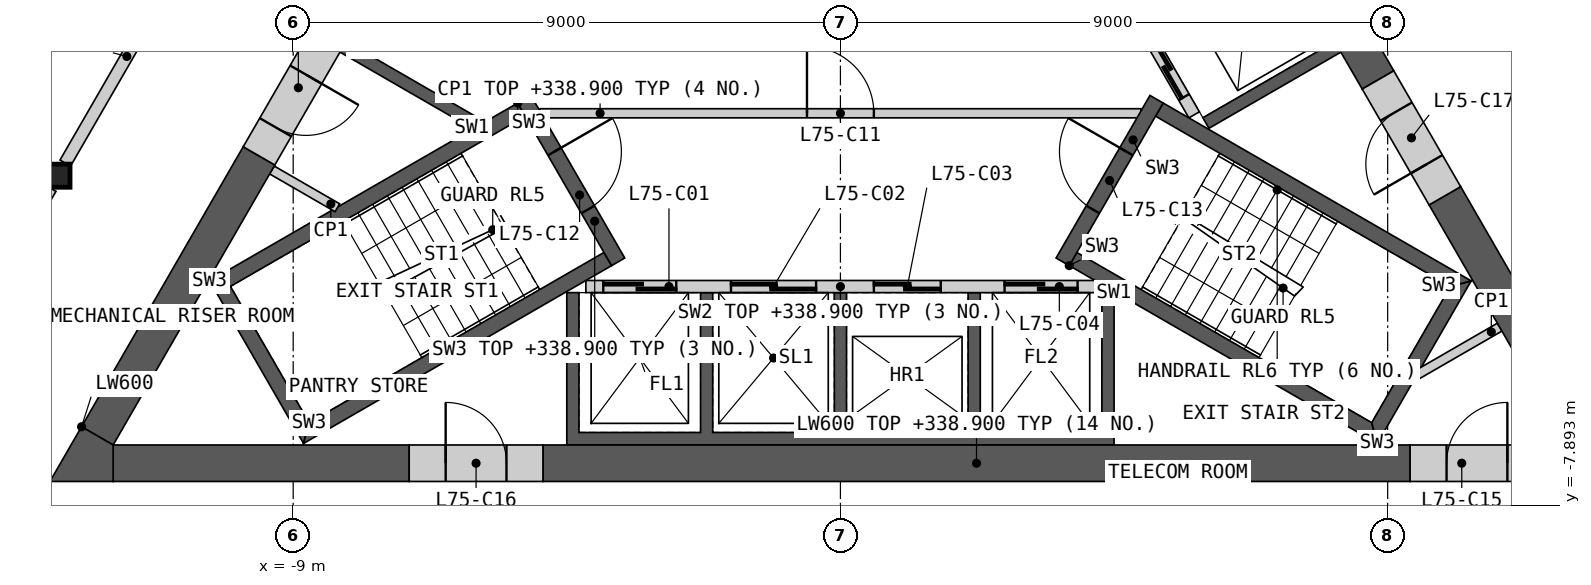
"""IFC4 building model, lengths in metres.
Left out: names, types, materials, properties, quantities, classifications, styles, units other than length and angle.
Written with IfcOpenShell. Run it as: python <this file> out.ifc"""

import sys

from ifc_helpers import new_model, si_unit, direction, frame, frame_2d, origin, origin_2d, place, context, subcontext, project, spatial, polyline, rectangle, i_section, outline, extrude, element, fill, save


model = new_model("IFC4")
c1 = context("Model", 3, precision=1e-05, world=origin(), true_north=direction((0.0, 1.0)))
c2 = subcontext(c1, "Body", "Model", "MODEL_VIEW")
j1 = project(units=[si_unit("LENGTHUNIT", "METRE"), si_unit("PLANEANGLEUNIT", "RADIAN")], contexts=[c1])
p1 = place(None, origin())
s1 = spatial("IfcSite", under=j1, at=p1, CompositionType="ELEMENT")
p2 = place(p1, origin())
s2 = spatial("IfcBuilding", under=s1, at=p2, CompositionType="ELEMENT")
p3 = place(p2, frame((0.0, 0.0, 335.8)))
s3 = spatial("IfcBuildingStorey", under=s2, at=p3, CompositionType="ELEMENT", Elevation=335.8)
p4 = place(p3, frame((-12.868, -2.476, 0.0), z_axis=(0.0, 0.0, 1.0), x_axis=(1.0, 0.0, 0.0)))
e1 = element("IfcColumn", 1, at=p4, inside=s3, PredefinedType="COLUMN", context=c2, shape_type="SweptSolid", body=[
    extrude(i_section(OverallWidth=0.396, OverallDepth=0.381, WebThickness=0.019, FlangeThickness=0.03, at=origin_2d()), origin(), (0.0, 0.0, 1.0), 3.4),
])
p5 = place(p3, origin())
e2 = element("IfcWall", 2, at=p5, inside=s3, PredefinedType="SHEAR", context=c2, shape_type="SweptSolid", body=[
    extrude(outline(polyline([(4.5, -4.4), (4.5, -6.906), (-4.5, -6.906), (-4.5, -4.4), (-4.3, -4.4), (-4.3, -6.7), (-2.3, -6.7), (-2.3, -4.4), (-2.1, -4.4), (-2.1, -6.7), (-0.1, -6.7), (-0.1, -4.4), (0.1, -4.4), (0.1, -6.7), (2.1, -6.7), (2.1, -4.4), (2.3, -4.4), (2.3, -6.7), (4.3, -6.7), (4.3, -4.4), (4.5, -4.4)])), origin(), (0.0, 0.0, 1.0), 3.1),
])
p6 = place(p3, frame((-4.187, -4.3, 0.0), z_axis=(0.0, 0.0, 1.0), x_axis=(1.0, 0.0, 0.0)))
e3 = element("IfcWall", 3, at=p6, inside=s3, PredefinedType="SOLIDWALL", context=c2, shape_type="SweptSolid", body=[
    extrude(rectangle(XDim=8.373, YDim=0.2, at=frame_2d((4.187, 0.0))), origin(), (0.0, 0.0, 1.0), 3.1),
])
p7 = place(p6, frame((0.287, 0.0, 0.0)))
e4 = element("IfcOpeningElement", 4, at=p7, cuts=e3, PredefinedType="OPENING", context=c2, shape_type="SweptSolid", body=[
    extrude(rectangle(XDim=1.2, YDim=2.1, at=frame_2d((0.6, 1.05))), frame((0.0, 0.11, 0.0), z_axis=(0.0, -1.0, 0.0), x_axis=(1.0, 0.0, 0.0)), (0.0, 0.0, 1.0), 0.22),
])
p8 = place(p6, frame((2.387, 0.0, 0.0)))
e5 = element("IfcOpeningElement", 5, at=p8, cuts=e3, PredefinedType="OPENING", context=c2, shape_type="SweptSolid", body=[
    extrude(rectangle(XDim=1.4, YDim=2.1, at=frame_2d((0.7, 1.05))), frame((0.0, 0.11, 0.0), z_axis=(0.0, -1.0, 0.0), x_axis=(1.0, 0.0, 0.0)), (0.0, 0.0, 1.0), 0.22),
])
p9 = place(p6, frame((4.737, 0.0, 0.0)))
e6 = element("IfcOpeningElement", 6, at=p9, cuts=e3, PredefinedType="OPENING", context=c2, shape_type="SweptSolid", body=[
    extrude(rectangle(XDim=1.1, YDim=2.1, at=frame_2d((0.55, 1.05))), frame((0.0, 0.11, 0.0), z_axis=(0.0, -1.0, 0.0), x_axis=(1.0, 0.0, 0.0)), (0.0, 0.0, 1.0), 0.22),
])
p10 = place(p6, frame((6.887, 0.0, 0.0)))
e7 = element("IfcOpeningElement", 7, at=p10, cuts=e3, PredefinedType="OPENING", context=c2, shape_type="SweptSolid", body=[
    extrude(rectangle(XDim=1.2, YDim=2.1, at=frame_2d((0.6, 1.05))), frame((0.0, 0.11, 0.0), z_axis=(0.0, -1.0, 0.0), x_axis=(1.0, 0.0, 0.0)), (0.0, 0.0, 1.0), 0.22),
])
p11 = place(p3, origin())
e8 = element("IfcWall", 8, at=p11, inside=s3, PredefinedType="SHEAR", context=c2, shape_type="SweptSolid", body=[
    extrude(outline(polyline([(1.561, 6.097), (3.731, 7.35), (8.231, -0.444), (6.061, -1.697), (5.96, -1.524), (7.952, -0.374), (6.952, 1.358), (4.96, 0.208), (4.861, 0.381), (6.852, 1.531), (5.852, 3.263), (3.861, 2.113), (3.76, 2.287), (5.752, 3.437), (4.752, 5.169), (2.76, 4.019), (2.66, 4.192), (4.652, 5.342), (3.652, 7.074), (1.66, 5.924), (1.561, 6.097)])), origin(), (0.0, 0.0, 1.0), 3.1),
])
p12 = place(p3, frame((5.817, -1.476, 0.0), z_axis=(0.0, 0.0, 1.0), x_axis=(-0.500002616675, 0.866023893041, 0.0)))
e9 = element("IfcWall", 9, at=p12, inside=s3, PredefinedType="SOLIDWALL", context=c2, shape_type="SweptSolid", body=[
    extrude(rectangle(XDim=8.373, YDim=0.2, at=frame_2d((4.187, 0.0))), origin(), (0.0, 0.0, 1.0), 3.1),
])
p13 = place(p12, frame((0.337, 0.0, 0.0)))
e10 = element("IfcOpeningElement", 10, at=p13, cuts=e9, PredefinedType="OPENING", context=c2, shape_type="SweptSolid", body=[
    extrude(rectangle(XDim=1.1, YDim=2.1, at=frame_2d((0.55, 1.05))), frame((0.0, 0.11, 0.0), z_axis=(0.0, -1.0, 0.0), x_axis=(1.0, 0.0, 0.0)), (0.0, 0.0, 1.0), 0.22),
])
p14 = place(p12, frame((2.537, 0.0, 0.0)))
e11 = element("IfcOpeningElement", 11, at=p14, cuts=e9, PredefinedType="OPENING", context=c2, shape_type="SweptSolid", body=[
    extrude(rectangle(XDim=1.1, YDim=2.1, at=frame_2d((0.55, 1.05))), frame((0.0, 0.11, 0.0), z_axis=(0.0, -1.0, 0.0), x_axis=(1.0, 0.0, 0.0)), (0.0, 0.0, 1.0), 0.22),
])
p15 = place(p12, frame((4.737, 0.0, 0.0)))
e12 = element("IfcOpeningElement", 12, at=p15, cuts=e9, PredefinedType="OPENING", context=c2, shape_type="SweptSolid", body=[
    extrude(rectangle(XDim=1.1, YDim=2.1, at=frame_2d((0.55, 1.05))), frame((0.0, 0.11, 0.0), z_axis=(0.0, -1.0, 0.0), x_axis=(1.0, 0.0, 0.0)), (0.0, 0.0, 1.0), 0.22),
])
p16 = place(p12, frame((7.037, 0.0, 0.0)))
e13 = element("IfcOpeningElement", 13, at=p16, cuts=e9, PredefinedType="OPENING", context=c2, shape_type="SweptSolid", body=[
    extrude(rectangle(XDim=0.9, YDim=2.1, at=frame_2d((0.45, 1.05))), frame((0.0, 0.11, 0.0), z_axis=(0.0, -1.0, 0.0), x_axis=(1.0, 0.0, 0.0)), (0.0, 0.0, 1.0), 0.22),
])
p17 = place(p3, origin())
e14 = element("IfcWall", 14, at=p17, inside=s3, PredefinedType="SHEAR", context=c2, shape_type="SweptSolid", body=[
    extrude(outline(polyline([(-6.061, -1.697), (-8.231, -0.444), (-8.131, -0.271), (-5.96, -1.524), (-6.061, -1.697)])), origin(), (0.0, 0.0, 1.0), 3.1),
])
p18 = place(p3, frame((-4.941, -1.45, 0.0), z_axis=(0.0, 0.0, 1.0), x_axis=(1.0, 0.0, 0.0)))
e15 = element("IfcWall", 15, at=p18, inside=s3, PredefinedType="PARTITIONING", context=c2, shape_type="SweptSolid", body=[
    extrude(rectangle(XDim=9.882, YDim=0.15, at=frame_2d((4.941, 0.0))), origin(), (0.0, 0.0, 1.0), 3.1),
])
p19 = place(p18, frame((4.391, 0.0, 0.0)))
e16 = element("IfcOpeningElement", 16, at=p19, cuts=e15, PredefinedType="OPENING", context=c2, shape_type="SweptSolid", body=[
    extrude(rectangle(XDim=1.1, YDim=2.1, at=frame_2d((0.55, 1.05))), frame((0.0, 0.085, 0.0), z_axis=(0.0, -1.0, 0.0), x_axis=(1.0, 0.0, 0.0)), (0.0, 0.0, 1.0), 0.17),
])
p20 = place(p3, origin())
e17 = element("IfcWall", 17, at=p20, inside=s3, PredefinedType="SHEAR", context=c2, shape_type="SweptSolid", body=[
    extrude(outline(polyline([(-5.307, -1.281), (-10.374, -4.206), (-10.032, -4.298), (-5.182, -1.498), (-5.307, -1.281)])), origin(), (0.0, 0.0, 1.0), 3.1),
])
p21 = place(p3, origin())
e18 = element("IfcWall", 18, at=p21, inside=s3, PredefinedType="SHEAR", context=c2, shape_type="SweptSolid", body=[
    extrude(outline(polyline([(-10.374, -4.206), (-8.83, -6.881), (-8.738, -6.539), (-10.032, -4.298), (-10.374, -4.206)])), origin(), (0.0, 0.0, 1.0), 3.1),
])
p22 = place(p3, origin())
e19 = element("IfcWall", 19, at=p22, inside=s3, PredefinedType="SHEAR", context=c2, shape_type="SweptSolid", body=[
    extrude(outline(polyline([(-8.738, -6.539), (-8.83, -6.881), (-3.763, -3.956), (-3.888, -3.739), (-8.738, -6.539)])), origin(), (0.0, 0.0, 1.0), 3.1),
])
p23 = place(p3, frame((-5.199, -1.219, 0.0), z_axis=(0.0, 0.0, 1.0), x_axis=(0.499982516597, -0.866035497597, 0.0)))
e20 = element("IfcWall", 20, at=p23, inside=s3, PredefinedType="SHEAR", context=c2, shape_type="SweptSolid", body=[
    extrude(rectangle(XDim=3.088, YDim=0.25, at=frame_2d((1.544, 0.0))), origin(), (0.0, 0.0, 1.0), 3.1),
])
p24 = place(p23, frame((0.994, 0.0, 0.0)))
e21 = element("IfcOpeningElement", 21, at=p24, cuts=e20, PredefinedType="OPENING", context=c2, shape_type="SweptSolid", body=[
    extrude(rectangle(XDim=1.1, YDim=2.1, at=frame_2d((0.55, 1.05))), frame((0.0, 0.135, 0.0), z_axis=(0.0, -1.0, 0.0), x_axis=(1.0, 0.0, 0.0)), (0.0, 0.0, 1.0), 0.27),
])
p25 = place(p3, origin())
e22 = element("IfcWall", 22, at=p25, inside=s3, PredefinedType="SHEAR", context=c2, shape_type="SweptSolid", body=[
    extrude(outline(polyline([(3.763, -3.956), (8.83, -6.881), (8.738, -6.539), (3.888, -3.739), (3.763, -3.956)])), origin(), (0.0, 0.0, 1.0), 3.1),
])
p26 = place(p3, origin())
e23 = element("IfcWall", 23, at=p26, inside=s3, PredefinedType="SHEAR", context=c2, shape_type="SweptSolid", body=[
    extrude(outline(polyline([(8.83, -6.881), (10.374, -4.206), (10.032, -4.298), (8.738, -6.539), (8.83, -6.881)])), origin(), (0.0, 0.0, 1.0), 3.1),
])
p27 = place(p3, origin())
e24 = element("IfcWall", 24, at=p27, inside=s3, PredefinedType="SHEAR", context=c2, shape_type="SweptSolid", body=[
    extrude(outline(polyline([(10.032, -4.298), (10.374, -4.206), (5.307, -1.281), (5.182, -1.498), (10.032, -4.298)])), origin(), (0.0, 0.0, 1.0), 3.1),
])
p28 = place(p3, frame((3.655, -3.893, 0.0), z_axis=(0.0, 0.0, 1.0), x_axis=(0.499982516597, 0.866035497597, 0.0)))
e25 = element("IfcWall", 25, at=p28, inside=s3, PredefinedType="SHEAR", context=c2, shape_type="SweptSolid", body=[
    extrude(rectangle(XDim=3.088, YDim=0.25, at=frame_2d((1.544, 0.0))), origin(), (0.0, 0.0, 1.0), 3.1),
])
p29 = place(p28, frame((0.994, 0.0, 0.0)))
e26 = element("IfcOpeningElement", 26, at=p29, cuts=e25, PredefinedType="OPENING", context=c2, shape_type="SweptSolid", body=[
    extrude(rectangle(XDim=1.1, YDim=2.1, at=frame_2d((0.55, 1.05))), frame((0.0, 0.135, 0.0), z_axis=(0.0, -1.0, 0.0), x_axis=(1.0, 0.0, 0.0)), (0.0, 0.0, 1.0), 0.27),
])
p30 = place(p3, frame((-9.35, -2.383, 0.0), z_axis=(0.0, 0.0, 1.0), x_axis=(0.866057962423, -0.499943602543, 0.0)))
e27 = element("IfcWall", 27, at=p30, inside=s3, PredefinedType="PARTITIONING", context=c2, shape_type="SweptSolid", body=[
    extrude(rectangle(XDim=1.242, YDim=0.15, at=frame_2d((0.621, 0.0))), origin(), (0.0, 0.0, 1.0), 3.1),
])
p31 = place(p3, frame((10.842, -4.967, 0.0), z_axis=(0.0, 0.0, 1.0), x_axis=(-0.866098216386, -0.499873863663, 0.0)))
e28 = element("IfcWall", 28, at=p31, inside=s3, PredefinedType="PARTITIONING", context=c2, shape_type="SweptSolid", body=[
    extrude(rectangle(XDim=1.582, YDim=0.15, at=frame_2d((0.791, 0.0))), origin(), (0.0, 0.0, 1.0), 3.1),
])
p32 = place(p3, frame((-4.892, -7.206, 0.0), z_axis=(0.0, 0.0, 1.0), x_axis=(1.0, 0.0, 0.0)))
e29 = element("IfcWall", 29, at=p32, inside=s3, PredefinedType="SHEAR", context=c2, shape_type="SweptSolid", body=[
    extrude(rectangle(XDim=14.261, YDim=0.6, at=frame_2d((7.13, 0.0))), origin(), (0.0, 0.0, 1.0), 3.1),
])
p33 = place(p3, frame((-11.961, -7.206, 0.0), z_axis=(0.0, 0.0, 1.0), x_axis=(1.0, 0.0, 0.0)))
e30 = element("IfcWall", 30, at=p33, inside=s3, PredefinedType="SHEAR", context=c2, shape_type="SweptSolid", body=[
    extrude(rectangle(XDim=4.868, YDim=0.6, at=frame_2d((2.434, 0.0))), origin(), (0.0, 0.0, 1.0), 3.1),
])
p34 = place(p3, frame((8.841, -0.902, 0.0), z_axis=(0.0, 0.0, 1.0), x_axis=(-0.499995618375, 0.866027933502, 0.0)))
e31 = element("IfcWall", 31, at=p34, inside=s3, PredefinedType="SHEAR", context=c2, shape_type="SweptSolid", body=[
    extrude(rectangle(XDim=14.571, YDim=0.6, at=frame_2d((7.285, 0.0))), origin(), (0.0, 0.0, 1.0), 3.1),
])
p35 = place(p3, frame((12.221, -6.756, 0.0), z_axis=(0.0, 0.0, 1.0), x_axis=(-0.500020646047, 0.866013483456, 0.0)))
e32 = element("IfcWall", 32, at=p35, inside=s3, PredefinedType="SHEAR", context=c2, shape_type="SweptSolid", body=[
    extrude(rectangle(XDim=4.559, YDim=0.6, at=frame_2d((2.28, 0.0))), origin(), (0.0, 0.0, 1.0), 3.1),
])
p36 = place(p3, frame((-9.562, -2.15, 0.0), z_axis=(0.0, 0.0, 1.0), x_axis=(-0.500015214976, -0.866016619236, 0.0)))
e33 = element("IfcWall", 33, at=p36, inside=s3, PredefinedType="SHEAR", context=c2, shape_type="SweptSolid", body=[
    extrude(rectangle(XDim=5.318, YDim=0.6, at=frame_2d((2.659, 0.0))), origin(), (0.0, 0.0, 1.0), 3.1),
])
p37 = place(p3, origin())
e34 = element("IfcWall", 34, at=p37, inside=s3, PredefinedType="SHEAR", context=c2, shape_type="SweptSolid", body=[
    extrude(outline(polyline([(-12.48, -6.606), (-11.961, -6.906), (-11.961, -7.506), (-13.0, -7.506), (-12.48, -6.606)])), origin(), (0.0, 0.0, 1.0), 3.1),
])
p38 = place(p3, frame((9.369, -7.206, 0.0), z_axis=(0.0, 0.0, 1.0), x_axis=(1.0, 0.0, 0.0)))
e35 = element("IfcWall", 35, at=p38, inside=s3, PredefinedType="SHEAR", context=c2, shape_type="SweptSolid", body=[
    extrude(rectangle(XDim=2.592, YDim=0.6, at=frame_2d((1.296, 0.0))), origin(), (0.0, 0.0, 1.0), 3.1),
])
p39 = place(p38, frame((0.6, 0.0, 0.0)))
e36 = element("IfcOpeningElement", 36, at=p39, cuts=e35, PredefinedType="OPENING", context=c2, shape_type="SweptSolid", body=[
    extrude(rectangle(XDim=1.0, YDim=2.1, at=frame_2d((0.5, 1.05))), frame((0.0, 0.31, 0.0), z_axis=(0.0, -1.0, 0.0), x_axis=(1.0, 0.0, 0.0)), (0.0, 0.0, 1.0), 0.62),
])
p40 = place(p3, frame((-7.092, -7.206, 0.0), z_axis=(0.0, 0.0, 1.0), x_axis=(1.0, 0.0, 0.0)))
e37 = element("IfcWall", 37, at=p40, inside=s3, PredefinedType="SHEAR", context=c2, shape_type="SweptSolid", body=[
    extrude(rectangle(XDim=2.2, YDim=0.6, at=frame_2d((1.1, 0.0))), origin(), (0.0, 0.0, 1.0), 3.1),
])
p41 = place(p40, frame((0.6, 0.0, 0.0)))
e38 = element("IfcOpeningElement", 38, at=p41, cuts=e37, PredefinedType="OPENING", context=c2, shape_type="SweptSolid", body=[
    extrude(rectangle(XDim=1.0, YDim=2.1, at=frame_2d((0.5, 1.05))), frame((0.0, 0.31, 0.0), z_axis=(0.0, -1.0, 0.0), x_axis=(1.0, 0.0, 0.0)), (0.0, 0.0, 1.0), 0.62),
])
p42 = place(p3, frame((9.941, -2.807, 0.0), z_axis=(0.0, 0.0, 1.0), x_axis=(-0.499994660107, 0.866028486751, 0.0)))
e39 = element("IfcWall", 39, at=p42, inside=s3, PredefinedType="SHEAR", context=c2, shape_type="SweptSolid", body=[
    extrude(rectangle(XDim=2.2, YDim=0.6, at=frame_2d((1.1, 0.0))), origin(), (0.0, 0.0, 1.0), 3.1),
])
p43 = place(p42, frame((0.6, 0.0, 0.0)))
e40 = element("IfcOpeningElement", 40, at=p43, cuts=e39, PredefinedType="OPENING", context=c2, shape_type="SweptSolid", body=[
    extrude(rectangle(XDim=1.0, YDim=2.1, at=frame_2d((0.5, 1.05))), frame((0.0, 0.31, 0.0), z_axis=(0.0, -1.0, 0.0), x_axis=(1.0, 0.0, 0.0)), (0.0, 0.0, 1.0), 0.62),
])
p44 = place(p3, frame((-8.44, -0.208, 0.0), z_axis=(0.0, 0.0, 1.0), x_axis=(-0.500001951578, -0.866024277037, 0.0)))
e41 = element("IfcWall", 41, at=p44, inside=s3, PredefinedType="SHEAR", context=c2, shape_type="SweptSolid", body=[
    extrude(rectangle(XDim=2.243, YDim=0.6, at=frame_2d((1.122, 0.0))), origin(), (0.0, 0.0, 1.0), 3.1),
])
p45 = place(p44, frame((0.7, 0.0, 0.0)))
e42 = element("IfcOpeningElement", 42, at=p45, cuts=e41, PredefinedType="OPENING", context=c2, shape_type="SweptSolid", body=[
    extrude(rectangle(XDim=1.0, YDim=2.1, at=frame_2d((0.5, 1.05))), frame((0.0, 0.31, 0.0), z_axis=(0.0, -1.0, 0.0), x_axis=(1.0, 0.0, 0.0)), (0.0, 0.0, 1.0), 0.62),
])
p46 = place(p3, frame((8.698, 4.745, 0.0), z_axis=(0.0, 0.0, 1.0), x_axis=(0.499984266882, -0.866034487114, 0.0)))
e43 = element("IfcWall", 43, at=p46, inside=s3, PredefinedType="PARTITIONING", context=c2, shape_type="SweptSolid", body=[
    extrude(rectangle(XDim=8.099, YDim=0.2, at=frame_2d((4.049, 0.0))), origin(), (0.0, 0.0, 1.0), 3.1),
])
p47 = place(p46, frame((1.164, 0.0, 0.0)))
e44 = element("IfcOpeningElement", 44, at=p47, cuts=e43, PredefinedType="OPENING", context=c2, shape_type="SweptSolid", body=[
    extrude(rectangle(XDim=1.0, YDim=2.1, at=frame_2d((0.5, 1.05))), frame((0.0, 0.11, 0.0), z_axis=(0.0, -1.0, 0.0), x_axis=(1.0, 0.0, 0.0)), (0.0, 0.0, 1.0), 0.22),
])
p48 = place(p3, frame((-12.748, -2.269, 0.0), z_axis=(0.0, 0.0, 1.0), x_axis=(0.499984266882, 0.866034487114, 0.0)))
e45 = element("IfcWall", 45, at=p48, inside=s3, PredefinedType="PARTITIONING", context=c2, shape_type="SweptSolid", body=[
    extrude(rectangle(XDim=8.099, YDim=0.2, at=frame_2d((4.049, 0.0))), origin(), (0.0, 0.0, 1.0), 3.1),
])
p49 = place(p48, frame((3.702, 0.0, 0.0)))
e46 = element("IfcOpeningElement", 46, at=p49, cuts=e45, PredefinedType="OPENING", context=c2, shape_type="SweptSolid", body=[
    extrude(rectangle(XDim=1.0, YDim=2.1, at=frame_2d((0.5, 1.05))), frame((0.0, 0.11, 0.0), z_axis=(0.0, -1.0, 0.0), x_axis=(1.0, 0.0, 0.0)), (0.0, 0.0, 1.0), 0.22),
])
p50 = place(p3, frame((-15.131, -6.397, 0.0), z_axis=(0.0, 0.0, 1.0), x_axis=(0.500003406062, 0.866023437285, 0.0)))
e47 = element("IfcWall", 47, at=p50, inside=s3, PredefinedType="PARTITIONING", context=c2, shape_type="SweptSolid", body=[
    extrude(rectangle(XDim=4.288, YDim=0.2, at=frame_2d((2.144, 0.0))), origin(), (0.0, 0.0, 1.0), 3.1),
])
p51 = place(p50, frame((0.766, 0.0, 0.0)))
e48 = element("IfcOpeningElement", 48, at=p51, cuts=e47, PredefinedType="OPENING", context=c2, shape_type="SweptSolid", body=[
    extrude(rectangle(XDim=1.0, YDim=2.1, at=frame_2d((0.5, 1.05))), frame((0.0, 0.11, 0.0), z_axis=(0.0, -1.0, 0.0), x_axis=(1.0, 0.0, 0.0)), (0.0, 0.0, 1.0), 0.22),
])
p52 = place(p7, origin())
e49 = element("IfcDoor", 49, at=p52, inside=s3, OperationType="SLIDING_TO_LEFT", PredefinedType="DOOR", context=c2, shape_type="SweptSolid", body=[
    extrude(rectangle(XDim=1.2, YDim=2.1, at=frame_2d((0.6, 1.05))), frame((0.0, 0.025, 0.0), z_axis=(0.0, -1.0, 0.0), x_axis=(1.0, 0.0, 0.0)), (0.0, 0.0, 1.0), 0.05),
])
fill(e4, e49)
p53 = place(p8, origin())
e50 = element("IfcDoor", 50, at=p53, inside=s3, OperationType="SLIDING_TO_LEFT", PredefinedType="DOOR", context=c2, shape_type="SweptSolid", body=[
    extrude(rectangle(XDim=1.4, YDim=2.1, at=frame_2d((0.7, 1.05))), frame((0.0, 0.025, 0.0), z_axis=(0.0, -1.0, 0.0), x_axis=(1.0, 0.0, 0.0)), (0.0, 0.0, 1.0), 0.05),
])
fill(e5, e50)
p54 = place(p9, origin())
e51 = element("IfcDoor", 51, at=p54, inside=s3, OperationType="SLIDING_TO_LEFT", PredefinedType="DOOR", context=c2, shape_type="SweptSolid", body=[
    extrude(rectangle(XDim=1.1, YDim=2.1, at=frame_2d((0.55, 1.05))), frame((0.0, 0.025, 0.0), z_axis=(0.0, -1.0, 0.0), x_axis=(1.0, 0.0, 0.0)), (0.0, 0.0, 1.0), 0.05),
])
fill(e6, e51)
p55 = place(p10, origin())
e52 = element("IfcDoor", 52, at=p55, inside=s3, OperationType="SLIDING_TO_LEFT", PredefinedType="DOOR", context=c2, shape_type="SweptSolid", body=[
    extrude(rectangle(XDim=1.2, YDim=2.1, at=frame_2d((0.6, 1.05))), frame((0.0, 0.025, 0.0), z_axis=(0.0, -1.0, 0.0), x_axis=(1.0, 0.0, 0.0)), (0.0, 0.0, 1.0), 0.05),
])
fill(e7, e52)
p56 = place(p13, origin())
e53 = element("IfcDoor", 53, at=p56, inside=s3, OperationType="SLIDING_TO_LEFT", PredefinedType="DOOR", context=c2, shape_type="SweptSolid", body=[
    extrude(rectangle(XDim=1.1, YDim=2.1, at=frame_2d((0.55, 1.05))), frame((0.0, 0.025, 0.0), z_axis=(0.0, -1.0, 0.0), x_axis=(1.0, 0.0, 0.0)), (0.0, 0.0, 1.0), 0.05),
])
fill(e10, e53)
p57 = place(p19, origin())
e54 = element("IfcDoor", 54, at=p57, inside=s3, OperationType="SINGLE_SWING_LEFT", PredefinedType="DOOR", context=c2, shape_type="SweptSolid", body=[
    extrude(rectangle(XDim=1.1, YDim=2.1, at=frame_2d((0.55, 1.05))), frame((0.0, 0.025, 0.0), z_axis=(0.0, -1.0, 0.0), x_axis=(1.0, 0.0, 0.0)), (0.0, 0.0, 1.0), 0.05),
])
fill(e16, e54)
p58 = place(p24, origin())
e55 = element("IfcDoor", 55, at=p58, inside=s3, OperationType="SINGLE_SWING_LEFT", PredefinedType="DOOR", context=c2, shape_type="SweptSolid", body=[
    extrude(rectangle(XDim=1.1, YDim=2.1, at=frame_2d((0.55, 1.05))), frame((0.0, 0.025, 0.0), z_axis=(0.0, -1.0, 0.0), x_axis=(1.0, 0.0, 0.0)), (0.0, 0.0, 1.0), 0.05),
])
fill(e21, e55)
p59 = place(p29, origin())
e56 = element("IfcDoor", 56, at=p59, inside=s3, OperationType="SINGLE_SWING_RIGHT", PredefinedType="DOOR", context=c2, shape_type="SweptSolid", body=[
    extrude(rectangle(XDim=1.1, YDim=2.1, at=frame_2d((0.55, 1.05))), frame((0.0, 0.025, 0.0), z_axis=(0.0, -1.0, 0.0), x_axis=(1.0, 0.0, 0.0)), (0.0, 0.0, 1.0), 0.05),
])
fill(e26, e56)
p60 = place(p39, origin())
e57 = element("IfcDoor", 57, at=p60, inside=s3, OperationType="SINGLE_SWING_RIGHT", PredefinedType="DOOR", context=c2, shape_type="SweptSolid", body=[
    extrude(rectangle(XDim=1.0, YDim=2.1, at=frame_2d((0.5, 1.05))), frame((0.0, 0.055, 0.0), z_axis=(0.0, -1.0, 0.0), x_axis=(1.0, 0.0, 0.0)), (0.0, 0.0, 1.0), 0.05),
])
fill(e36, e57)
p61 = place(p41, origin())
e58 = element("IfcDoor", 58, at=p61, inside=s3, OperationType="SINGLE_SWING_LEFT", PredefinedType="DOOR", context=c2, shape_type="SweptSolid", body=[
    extrude(rectangle(XDim=1.0, YDim=2.1, at=frame_2d((0.5, 1.05))), frame((0.0, 0.055, 0.0), z_axis=(0.0, -1.0, 0.0), x_axis=(1.0, 0.0, 0.0)), (0.0, 0.0, 1.0), 0.05),
])
fill(e38, e58)
p62 = place(p43, origin())
e59 = element("IfcDoor", 59, at=p62, inside=s3, OperationType="SINGLE_SWING_LEFT", PredefinedType="DOOR", context=c2, shape_type="SweptSolid", body=[
    extrude(rectangle(XDim=1.0, YDim=2.1, at=frame_2d((0.5, 1.05))), frame((0.0, 0.055, 0.0), z_axis=(0.0, -1.0, 0.0), x_axis=(1.0, 0.0, 0.0)), (0.0, 0.0, 1.0), 0.05),
])
fill(e40, e59)
p63 = place(p45, origin())
e60 = element("IfcDoor", 60, at=p63, inside=s3, OperationType="SINGLE_SWING_LEFT", PredefinedType="DOOR", context=c2, shape_type="SweptSolid", body=[
    extrude(rectangle(XDim=1.0, YDim=2.1, at=frame_2d((0.5, 1.05))), frame((0.0, 0.055, 0.0), z_axis=(0.0, -1.0, 0.0), x_axis=(1.0, 0.0, 0.0)), (0.0, 0.0, 1.0), 0.05),
])
fill(e42, e60)
save(model, sys.argv[1])
